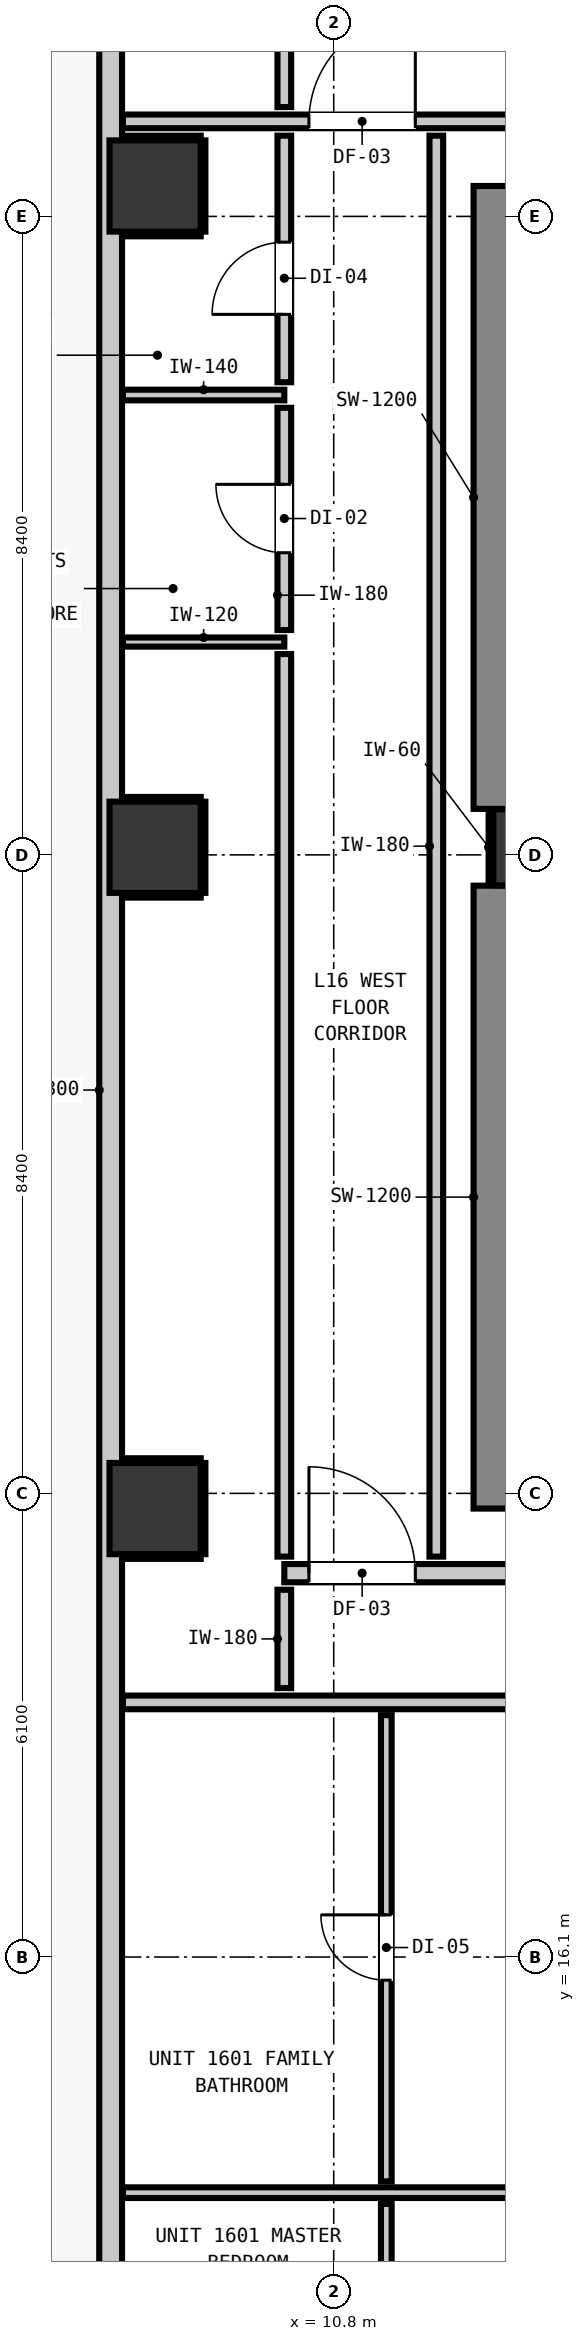
"""IFC4 building model, lengths in metres.
Left out: names, types, materials, properties, quantities, classifications, styles, units other than length and angle.
Written with IfcOpenShell. Run it as: python <this file> out.ifc"""

import sys

from ifc_helpers import new_model, si_unit, direction, frame, frame_2d, origin, origin_2d, place, context, subcontext, project, spatial, rectangle, extrude, element, fill, save


model = new_model("IFC4")
c1 = context("Model", 3, precision=1e-05, world=origin(), true_north=direction((0.0, 1.0)))
c2 = subcontext(c1, "Body", "Model", "MODEL_VIEW")
j1 = project(units=[si_unit("LENGTHUNIT", "METRE"), si_unit("PLANEANGLEUNIT", "RADIAN")], contexts=[c1])
p1 = place(None, origin())
s1 = spatial("IfcSite", under=j1, at=p1, CompositionType="ELEMENT")
p2 = place(p1, origin())
s2 = spatial("IfcBuilding", under=s1, at=p2, CompositionType="ELEMENT")
p3 = place(p2, frame((0.0, 0.0, 58.52)))
s3 = spatial("IfcBuildingStorey", under=s2, at=p3, CompositionType="ELEMENT", Elevation=58.52)
p4 = place(p3, frame((13.4, 30.7, 0.0), z_axis=(0.0, 0.0, 1.0), x_axis=(1.0, 0.0, 0.0)))
e1 = element("IfcColumn", 1, at=p4, inside=s3, PredefinedType="COLUMN", context=c2, shape_type="SweptSolid", body=[
    extrude(rectangle(XDim=1.0, YDim=1.0, at=origin_2d()), origin(), (0.0, 0.0, 1.0), 3.32),
])
p5 = place(p3, frame((13.24, 22.0, 0.0), z_axis=(0.0, 0.0, 1.0), x_axis=(0.0, 1.0, 0.0)))
e2 = element("IfcWall", 2, at=p5, inside=s3, PredefinedType="SHEAR", context=c2, shape_type="SweptSolid", body=[
    extrude(rectangle(XDim=8.195, YDim=1.2, at=frame_2d((4.098, 0.0))), origin(), (0.0, 0.0, 1.0), 3.32),
])
p6 = place(p3, frame((13.24, 31.205, 0.0), z_axis=(0.0, 0.0, 1.0), x_axis=(0.0, 1.0, 0.0)))
e3 = element("IfcWall", 3, at=p6, inside=s3, PredefinedType="SHEAR", context=c2, shape_type="SweptSolid", body=[
    extrude(rectangle(XDim=8.195, YDim=1.2, at=frame_2d((4.097, 0.0))), origin(), (0.0, 0.0, 1.0), 3.32),
])
for number, where, z_axis, x_axis in (
    (4, (8.45, 22.0, 0.0), (0.0, 0.0, 1.0), (1.0, 0.0, 0.0)),
    (5, (8.45, 30.7, 0.0), (0.0, 0.0, 1.0), (1.0, 0.0, 0.0)),
    (6, (8.45, 39.4, 0.0), (0.0, 0.0, 1.0), (1.0, 0.0, 0.0)),
):
    element("IfcColumn", number, at=place(p3, frame(where, z_axis=z_axis, x_axis=x_axis)), inside=s3, PredefinedType="COLUMN", context=c2, shape_type="SweptSolid", body=[
        extrude(rectangle(XDim=1.2, YDim=1.2, at=origin_2d()), origin(), (0.0, 0.0, 1.0), 2.9),
    ])
p7 = place(p3, frame((7.865, 10.165, 0.0), z_axis=(0.0, 0.0, 1.0), x_axis=(0.0, 1.0, 0.0)))
e7 = element("IfcWall", 7, at=p7, inside=s3, PredefinedType="STANDARD", context=c2, shape_type="SweptSolid", body=[
    extrude(rectangle(XDim=34.67, YDim=0.3, at=frame_2d((17.335, 0.0))), origin(), (0.0, 0.0, 1.0), 2.9),
])
p8 = place(p7, frame((0.901, 0.0, 0.0)))
e8 = element("IfcOpeningElement", 8, at=p8, cuts=e7, PredefinedType="OPENING", context=c2, shape_type="SweptSolid", body=[
    extrude(rectangle(XDim=1.0, YDim=2.15, at=frame_2d((0.5, 1.075))), frame((0.0, 0.16, 0.0), z_axis=(0.0, -1.0, 0.0), x_axis=(1.0, 0.0, 0.0)), (0.0, 0.0, 1.0), 0.32),
])
p9 = place(p7, frame((32.782, 0.0, 0.85)))
e9 = element("IfcOpeningElement", 9, at=p9, cuts=e7, PredefinedType="OPENING", context=c2, shape_type="SweptSolid", body=[
    extrude(rectangle(XDim=0.9, YDim=1.5, at=frame_2d((0.45, 0.75))), frame((0.0, 0.16, 0.0), z_axis=(0.0, -1.0, 0.0), x_axis=(1.0, 0.0, 0.0)), (0.0, 0.0, 1.0), 0.32),
])
p10 = place(p3, frame((10.15, 21.15, 0.0), z_axis=(0.0, 0.0, 1.0), x_axis=(1.0, 0.0, 0.0)))
e10 = element("IfcWall", 10, at=p10, inside=s3, PredefinedType="PARTITIONING", context=c2, shape_type="SweptSolid", body=[
    extrude(rectangle(XDim=40.023, YDim=0.24, at=frame_2d((20.012, 0.0))), origin(), (0.0, 0.0, 1.0), 2.9),
])
p11 = place(p10, frame((8.06, 0.0, 0.0)))
e11 = element("IfcOpeningElement", 11, at=p11, cuts=e10, PredefinedType="OPENING", context=c2, shape_type="SweptSolid", body=[
    extrude(rectangle(XDim=1.1, YDim=2.15, at=frame_2d((0.55, 1.075))), frame((0.0, 0.13, 0.0), z_axis=(0.0, -1.0, 0.0), x_axis=(1.0, 0.0, 0.0)), (0.0, 0.0, 1.0), 0.26),
])
p12 = place(p10, frame((0.324, 0.0, 0.0)))
e12 = element("IfcOpeningElement", 12, at=p12, cuts=e10, PredefinedType="OPENING", context=c2, shape_type="SweptSolid", body=[
    extrude(rectangle(XDim=1.4, YDim=2.15, at=frame_2d((0.7, 1.075))), frame((0.0, 0.13, 0.0), z_axis=(0.0, -1.0, 0.0), x_axis=(1.0, 0.0, 0.0)), (0.0, 0.0, 1.0), 0.26),
])
p13 = place(p10, frame((31.825, 0.0, 0.0)))
e13 = element("IfcOpeningElement", 13, at=p13, cuts=e10, PredefinedType="OPENING", context=c2, shape_type="SweptSolid", body=[
    extrude(rectangle(XDim=1.0, YDim=2.15, at=frame_2d((0.5, 1.075))), frame((0.0, 0.13, 0.0), z_axis=(0.0, -1.0, 0.0), x_axis=(1.0, 0.0, 0.0)), (0.0, 0.0, 1.0), 0.26),
])
p14 = place(p3, frame((8.027, 19.45, 0.0), z_axis=(0.0, 0.0, 1.0), x_axis=(1.0, 0.0, 0.0)))
e14 = element("IfcWall", 14, at=p14, inside=s3, PredefinedType="PARTITIONING", context=c2, shape_type="SweptSolid", body=[
    extrude(rectangle(XDim=42.146, YDim=0.18, at=frame_2d((21.073, 0.0))), origin(), (0.0, 0.0, 1.0), 2.9),
])
p15 = place(p14, frame((6.697, 0.0, 0.0)))
e15 = element("IfcOpeningElement", 15, at=p15, cuts=e14, PredefinedType="OPENING", context=c2, shape_type="SweptSolid", body=[
    extrude(rectangle(XDim=1.0, YDim=2.15, at=frame_2d((0.5, 1.075))), frame((0.0, 0.1, 0.0), z_axis=(0.0, -1.0, 0.0), x_axis=(1.0, 0.0, 0.0)), (0.0, 0.0, 1.0), 0.2),
])
p16 = place(p14, frame((33.038, 0.0, 0.0)))
e16 = element("IfcOpeningElement", 16, at=p16, cuts=e14, PredefinedType="OPENING", context=c2, shape_type="SweptSolid", body=[
    extrude(rectangle(XDim=0.9, YDim=2.1, at=frame_2d((0.45, 1.05))), frame((0.0, 0.1, 0.0), z_axis=(0.0, -1.0, 0.0), x_axis=(1.0, 0.0, 0.0)), (0.0, 0.0, 1.0), 0.2),
])
p17 = place(p3, frame((8.027, 40.25, 0.0), z_axis=(0.0, 0.0, 1.0), x_axis=(1.0, 0.0, 0.0)))
e17 = element("IfcWall", 17, at=p17, inside=s3, PredefinedType="PARTITIONING", context=c2, shape_type="SweptSolid", body=[
    extrude(rectangle(XDim=42.146, YDim=0.18, at=frame_2d((21.073, 0.0))), origin(), (0.0, 0.0, 1.0), 2.9),
])
p18 = place(p17, frame((9.408, 0.0, 0.0)))
e18 = element("IfcOpeningElement", 18, at=p18, cuts=e17, PredefinedType="OPENING", context=c2, shape_type="SweptSolid", body=[
    extrude(rectangle(XDim=1.4, YDim=2.15, at=frame_2d((0.7, 1.075))), frame((0.0, 0.1, 0.0), z_axis=(0.0, -1.0, 0.0), x_axis=(1.0, 0.0, 0.0)), (0.0, 0.0, 1.0), 0.2),
])
p19 = place(p17, frame((2.447, 0.0, 0.0)))
e19 = element("IfcOpeningElement", 19, at=p19, cuts=e17, PredefinedType="OPENING", context=c2, shape_type="SweptSolid", body=[
    extrude(rectangle(XDim=1.4, YDim=2.15, at=frame_2d((0.7, 1.075))), frame((0.0, 0.1, 0.0), z_axis=(0.0, -1.0, 0.0), x_axis=(1.0, 0.0, 0.0)), (0.0, 0.0, 1.0), 0.2),
])
p20 = place(p17, frame((35.474, 0.0, 0.0)))
e20 = element("IfcOpeningElement", 20, at=p20, cuts=e17, PredefinedType="OPENING", context=c2, shape_type="SweptSolid", body=[
    extrude(rectangle(XDim=0.9, YDim=2.1, at=frame_2d((0.45, 1.05))), frame((0.0, 0.1, 0.0), z_axis=(0.0, -1.0, 0.0), x_axis=(1.0, 0.0, 0.0)), (0.0, 0.0, 1.0), 0.2),
])
p21 = place(p3, frame((8.027, 13.0, 0.0), z_axis=(0.0, 0.0, 1.0), x_axis=(1.0, 0.0, 0.0)))
e21 = element("IfcWall", 21, at=p21, inside=s3, PredefinedType="PARTITIONING", context=c2, shape_type="SweptSolid", body=[
    extrude(rectangle(XDim=24.852, YDim=0.14, at=frame_2d((12.426, 0.0))), origin(), (0.0, 0.0, 1.0), 2.9),
])
p22 = place(p21, frame((6.747, 0.0, 0.0)))
e22 = element("IfcOpeningElement", 22, at=p22, cuts=e21, PredefinedType="OPENING", context=c2, shape_type="SweptSolid", body=[
    extrude(rectangle(XDim=0.9, YDim=2.1, at=frame_2d((0.45, 1.05))), frame((0.0, 0.08, 0.0), z_axis=(0.0, -1.0, 0.0), x_axis=(1.0, 0.0, 0.0)), (0.0, 0.0, 1.0), 0.16),
])
p23 = place(p3, frame((8.027, 36.65, 0.0), z_axis=(0.0, 0.0, 1.0), x_axis=(1.0, 0.0, 0.0)))
e23 = element("IfcWall", 23, at=p23, inside=s3, PredefinedType="PARTITIONING", context=c2, shape_type="SweptSolid", body=[
    extrude(rectangle(XDim=2.123, YDim=0.14, at=frame_2d((1.062, 0.0))), origin(), (0.0, 0.0, 1.0), 2.9),
])
p24 = place(p3, frame((8.027, 33.4, 0.0), z_axis=(0.0, 0.0, 1.0), x_axis=(1.0, 0.0, 0.0)))
e24 = element("IfcWall", 24, at=p24, inside=s3, PredefinedType="PARTITIONING", context=c2, shape_type="SweptSolid", body=[
    extrude(rectangle(XDim=2.123, YDim=0.12, at=frame_2d((1.062, 0.0))), origin(), (0.0, 0.0, 1.0), 2.9),
])
p25 = place(p3, frame((10.15, 19.638, 0.0), z_axis=(0.0, 0.0, 1.0), x_axis=(0.0, 1.0, 0.0)))
e25 = element("IfcWall", 25, at=p25, inside=s3, PredefinedType="PARTITIONING", context=c2, shape_type="SweptSolid", body=[
    extrude(rectangle(XDim=1.294, YDim=0.18, at=frame_2d((0.647, 0.0))), origin(), (0.0, 0.0, 1.0), 2.9),
])
p26 = place(p3, frame((10.15, 21.368, 0.0), z_axis=(0.0, 0.0, 1.0), x_axis=(0.0, 1.0, 0.0)))
e26 = element("IfcWall", 26, at=p26, inside=s3, PredefinedType="PARTITIONING", context=c2, shape_type="SweptSolid", body=[
    extrude(rectangle(XDim=11.874, YDim=0.18, at=frame_2d((5.937, 0.0))), origin(), (0.0, 0.0, 1.0), 2.9),
])
p27 = place(p3, frame((10.15, 33.558, 0.0), z_axis=(0.0, 0.0, 1.0), x_axis=(0.0, 1.0, 0.0)))
e27 = element("IfcWall", 27, at=p27, inside=s3, PredefinedType="PARTITIONING", context=c2, shape_type="SweptSolid", body=[
    extrude(rectangle(XDim=2.924, YDim=0.18, at=frame_2d((1.462, 0.0))), origin(), (0.0, 0.0, 1.0), 2.9),
])
p28 = place(p27, frame((1.017, 0.0, 0.0)))
e28 = element("IfcOpeningElement", 28, at=p28, cuts=e27, PredefinedType="OPENING", context=c2, shape_type="SweptSolid", body=[
    extrude(rectangle(XDim=0.9, YDim=2.1, at=frame_2d((0.45, 1.05))), frame((0.0, 0.1, 0.0), z_axis=(0.0, -1.0, 0.0), x_axis=(1.0, 0.0, 0.0)), (0.0, 0.0, 1.0), 0.2),
])
p29 = place(p3, frame((10.15, 36.818, 0.0), z_axis=(0.0, 0.0, 1.0), x_axis=(0.0, 1.0, 0.0)))
e29 = element("IfcWall", 29, at=p29, inside=s3, PredefinedType="PARTITIONING", context=c2, shape_type="SweptSolid", body=[
    extrude(rectangle(XDim=3.244, YDim=0.18, at=frame_2d((1.622, 0.0))), origin(), (0.0, 0.0, 1.0), 2.9),
])
p30 = place(p29, frame((0.893, 0.0, 0.0)))
e30 = element("IfcOpeningElement", 30, at=p30, cuts=e29, PredefinedType="OPENING", context=c2, shape_type="SweptSolid", body=[
    extrude(rectangle(XDim=0.95, YDim=2.1, at=frame_2d((0.475, 1.05))), frame((0.0, 0.1, 0.0), z_axis=(0.0, -1.0, 0.0), x_axis=(1.0, 0.0, 0.0)), (0.0, 0.0, 1.0), 0.2),
])
p31 = place(p3, frame((10.15, 40.438, 0.0), z_axis=(0.0, 0.0, 1.0), x_axis=(0.0, 1.0, 0.0)))
e31 = element("IfcWall", 31, at=p31, inside=s3, PredefinedType="PARTITIONING", context=c2, shape_type="SweptSolid", body=[
    extrude(rectangle(XDim=1.324, YDim=0.18, at=frame_2d((0.662, 0.0))), origin(), (0.0, 0.0, 1.0), 2.9),
])
p32 = place(p3, frame((12.15, 21.368, 0.0), z_axis=(0.0, 0.0, 1.0), x_axis=(0.0, 1.0, 0.0)))
e32 = element("IfcWall", 32, at=p32, inside=s3, PredefinedType="PARTITIONING", context=c2, shape_type="SweptSolid", body=[
    extrude(rectangle(XDim=18.694, YDim=0.18, at=frame_2d((9.347, 0.0))), origin(), (0.0, 0.0, 1.0), 2.9),
])
p33 = place(p3, frame((11.492, 7.827, 0.0), z_axis=(0.0, 0.0, 1.0), x_axis=(0.0, 1.0, 0.0)))
e33 = element("IfcWall", 33, at=p33, inside=s3, PredefinedType="PARTITIONING", context=c2, shape_type="SweptSolid", body=[
    extrude(rectangle(XDim=5.025, YDim=0.14, at=frame_2d((2.513, 0.0))), origin(), (0.0, 0.0, 1.0), 2.9),
])
p34 = place(p33, frame((2.123, 0.0, 0.0)))
e34 = element("IfcOpeningElement", 34, at=p34, cuts=e33, PredefinedType="OPENING", context=c2, shape_type="SweptSolid", body=[
    extrude(rectangle(XDim=0.9, YDim=2.1, at=frame_2d((0.45, 1.05))), frame((0.0, 0.08, 0.0), z_axis=(0.0, -1.0, 0.0), x_axis=(1.0, 0.0, 0.0)), (0.0, 0.0, 1.0), 0.16),
])
p35 = place(p3, frame((11.492, 13.148, 0.0), z_axis=(0.0, 0.0, 1.0), x_axis=(0.0, 1.0, 0.0)))
e35 = element("IfcWall", 35, at=p35, inside=s3, PredefinedType="PARTITIONING", context=c2, shape_type="SweptSolid", body=[
    extrude(rectangle(XDim=6.134, YDim=0.14, at=frame_2d((3.067, 0.0))), origin(), (0.0, 0.0, 1.0), 2.9),
])
p36 = place(p35, frame((2.647, 0.0, 0.0)))
e36 = element("IfcOpeningElement", 36, at=p36, cuts=e35, PredefinedType="OPENING", context=c2, shape_type="SweptSolid", body=[
    extrude(rectangle(XDim=0.86, YDim=2.02, at=frame_2d((0.43, 1.01))), frame((0.0, 0.08, 0.0), z_axis=(0.0, -1.0, 0.0), x_axis=(1.0, 0.0, 0.0)), (0.0, 0.0, 1.0), 0.16),
])
p37 = place(p3, frame((12.868, 30.21, 0.0), z_axis=(0.0, 0.0, 1.0), x_axis=(0.0, 1.0, 0.0)))
e37 = element("IfcWall", 37, at=p37, inside=s3, PredefinedType="PARTITIONING", context=c2, shape_type="SweptSolid", body=[
    extrude(rectangle(XDim=0.98, YDim=0.06, at=frame_2d((0.49, 0.0))), origin(), (0.0, 0.0, 1.0), 0.905),
])
for number, where, z_axis, x_axis in (
    (38, (8.03, 21.368, 0.0), (0.0, 0.0, 1.0), (1.0, 0.0, 0.0)),
    (39, (8.03, 22.632, 0.0), (0.0, 0.0, 1.0), (1.0, 0.0, 0.0)),
):
    element("IfcWall", number, at=place(p3, frame(where, z_axis=z_axis, x_axis=x_axis)), inside=s3, PredefinedType="PARTITIONING", context=c2, shape_type="SweptSolid", body=[
        extrude(rectangle(XDim=1.02, YDim=0.06, at=frame_2d((0.51, 0.0))), origin(), (0.0, 0.0, 1.0), 0.905),
    ])
p38 = place(p3, frame((9.082, 21.4, 0.0), z_axis=(0.0, 0.0, 1.0), x_axis=(0.0, 1.0, 0.0)))
e40 = element("IfcWall", 40, at=p38, inside=s3, PredefinedType="PARTITIONING", context=c2, shape_type="SweptSolid", body=[
    extrude(rectangle(XDim=1.2, YDim=0.06, at=frame_2d((0.6, 0.0))), origin(), (0.0, 0.0, 1.0), 1.45),
])
for number, where, z_axis, x_axis in (
    (41, (8.03, 30.068, 0.0), (0.0, 0.0, 1.0), (1.0, 0.0, 0.0)),
    (42, (8.03, 31.332, 0.0), (0.0, 0.0, 1.0), (1.0, 0.0, 0.0)),
):
    element("IfcWall", number, at=place(p3, frame(where, z_axis=z_axis, x_axis=x_axis)), inside=s3, PredefinedType="PARTITIONING", context=c2, shape_type="SweptSolid", body=[
        extrude(rectangle(XDim=1.02, YDim=0.06, at=frame_2d((0.51, 0.0))), origin(), (0.0, 0.0, 1.0), 0.905),
    ])
p39 = place(p3, frame((9.082, 30.1, 0.0), z_axis=(0.0, 0.0, 1.0), x_axis=(0.0, 1.0, 0.0)))
e43 = element("IfcWall", 43, at=p39, inside=s3, PredefinedType="PARTITIONING", context=c2, shape_type="SweptSolid", body=[
    extrude(rectangle(XDim=1.2, YDim=0.06, at=frame_2d((0.6, 0.0))), origin(), (0.0, 0.0, 1.0), 1.45),
])
for number, where, z_axis, x_axis in (
    (44, (8.03, 38.768, 0.0), (0.0, 0.0, 1.0), (1.0, 0.0, 0.0)),
    (45, (8.03, 40.032, 0.0), (0.0, 0.0, 1.0), (1.0, 0.0, 0.0)),
):
    element("IfcWall", number, at=place(p3, frame(where, z_axis=z_axis, x_axis=x_axis)), inside=s3, PredefinedType="PARTITIONING", context=c2, shape_type="SweptSolid", body=[
        extrude(rectangle(XDim=1.02, YDim=0.06, at=frame_2d((0.51, 0.0))), origin(), (0.0, 0.0, 1.0), 0.905),
    ])
p40 = place(p3, frame((9.082, 38.8, 0.0), z_axis=(0.0, 0.0, 1.0), x_axis=(0.0, 1.0, 0.0)))
e46 = element("IfcWall", 46, at=p40, inside=s3, PredefinedType="PARTITIONING", context=c2, shape_type="SweptSolid", body=[
    extrude(rectangle(XDim=1.2, YDim=0.06, at=frame_2d((0.6, 0.0))), origin(), (0.0, 0.0, 1.0), 1.45),
])
p41 = place(p12, origin())
e47 = element("IfcDoor", 47, at=p41, inside=s3, OperationType="SINGLE_SWING_LEFT", PredefinedType="DOOR", context=c2, shape_type="SweptSolid", body=[
    extrude(rectangle(XDim=1.4, YDim=2.15, at=frame_2d((0.7, 1.075))), frame((0.0, 0.025, 0.0), z_axis=(0.0, -1.0, 0.0), x_axis=(1.0, 0.0, 0.0)), (0.0, 0.0, 1.0), 0.05),
])
fill(e12, e47)
p42 = place(p19, origin())
e48 = element("IfcDoor", 48, at=p42, inside=s3, OperationType="SINGLE_SWING_RIGHT", PredefinedType="DOOR", context=c2, shape_type="SweptSolid", body=[
    extrude(rectangle(XDim=1.4, YDim=2.15, at=frame_2d((0.7, 1.075))), frame((0.0, 0.025, 0.0), z_axis=(0.0, -1.0, 0.0), x_axis=(1.0, 0.0, 0.0)), (0.0, 0.0, 1.0), 0.05),
])
fill(e19, e48)
p43 = place(p36, origin())
e49 = element("IfcDoor", 49, at=p43, inside=s3, OperationType="SINGLE_SWING_RIGHT", PredefinedType="DOOR", context=c2, shape_type="SweptSolid", body=[
    extrude(rectangle(XDim=0.86, YDim=2.02, at=frame_2d((0.43, 1.01))), frame((0.0, 0.025, 0.0), z_axis=(0.0, -1.0, 0.0), x_axis=(1.0, 0.0, 0.0)), (0.0, 0.0, 1.0), 0.05),
])
fill(e36, e49)
p44 = place(p28, origin())
e50 = element("IfcDoor", 50, at=p44, inside=s3, OperationType="SINGLE_SWING_RIGHT", PredefinedType="DOOR", context=c2, shape_type="SweptSolid", body=[
    extrude(rectangle(XDim=0.9, YDim=2.1, at=frame_2d((0.45, 1.05))), frame((0.0, 0.025, 0.0), z_axis=(0.0, -1.0, 0.0), x_axis=(1.0, 0.0, 0.0)), (0.0, 0.0, 1.0), 0.05),
])
fill(e28, e50)
p45 = place(p30, origin())
e51 = element("IfcDoor", 51, at=p45, inside=s3, OperationType="SINGLE_SWING_LEFT", PredefinedType="DOOR", context=c2, shape_type="SweptSolid", body=[
    extrude(rectangle(XDim=0.95, YDim=2.1, at=frame_2d((0.475, 1.05))), frame((0.0, 0.025, 0.0), z_axis=(0.0, -1.0, 0.0), x_axis=(1.0, 0.0, 0.0)), (0.0, 0.0, 1.0), 0.05),
])
fill(e30, e51)
save(model, sys.argv[1])
